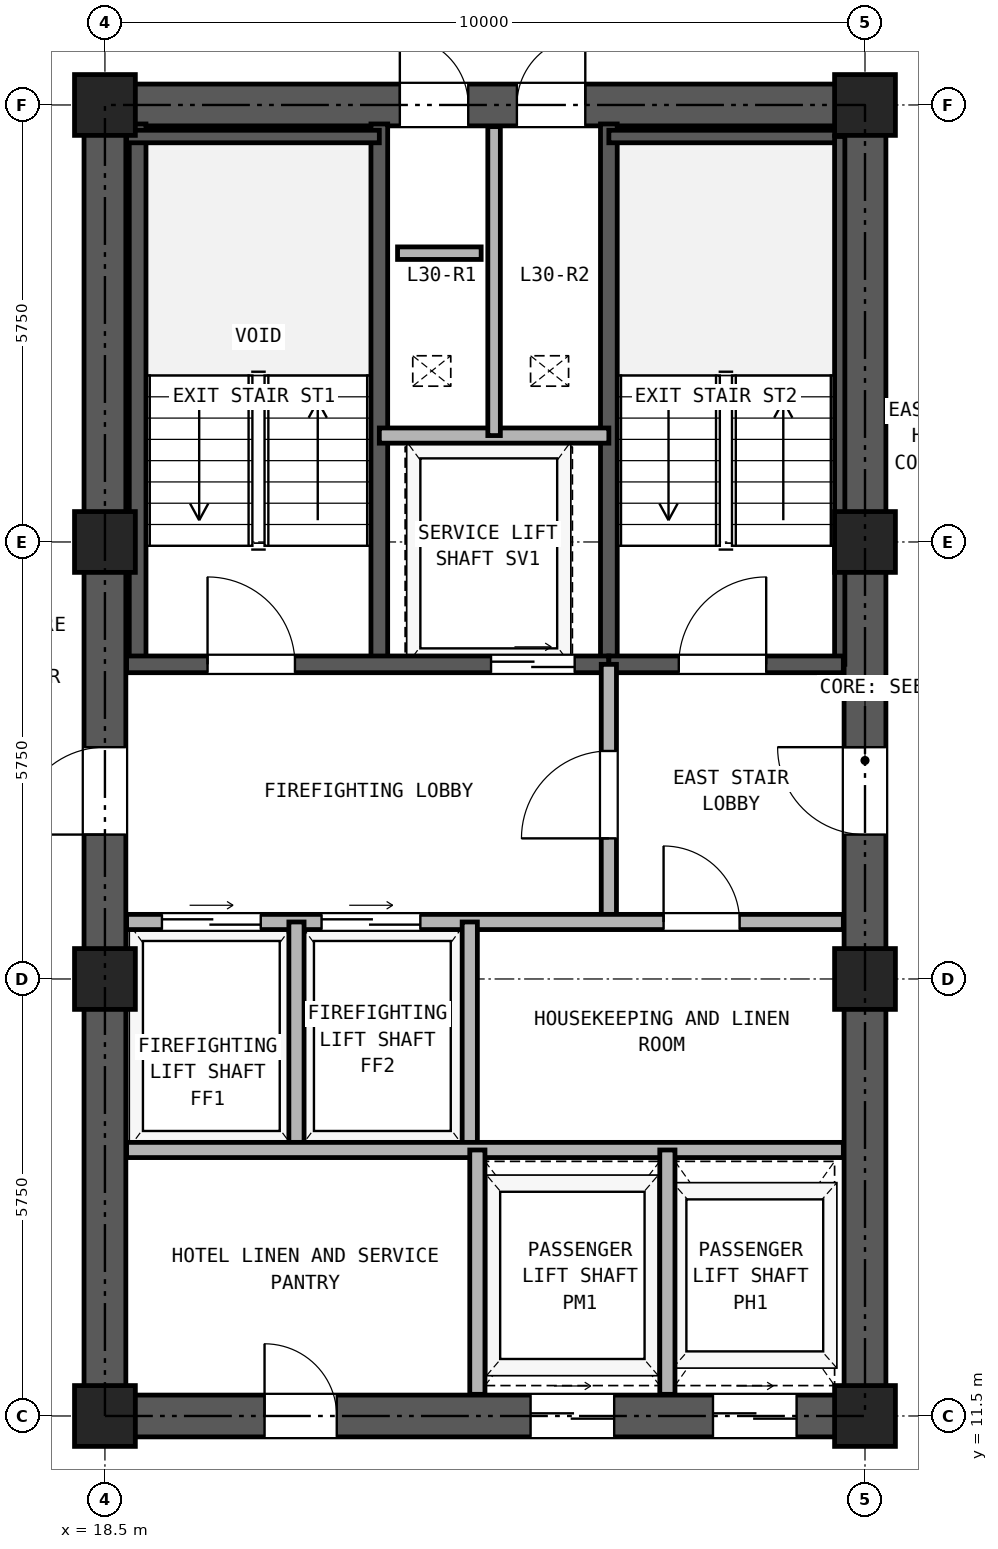
"""IFC4 building model, lengths in metres.
Left out: names, types, materials, properties, quantities, classifications, styles, units other than length and angle.
Written with IfcOpenShell. Run it as: python <this file> out.ifc"""

import sys

from ifc_helpers import new_model, si_unit, direction, frame, frame_2d, origin, origin_2d, place, context, subcontext, project, spatial, rectangle, hollow_rectangle, extrude, source, transform, mapped, element, fill, save


model = new_model("IFC4")
c1 = context("Model", 3, precision=1e-05, world=origin(), true_north=direction((0.0, 1.0)))
c2 = subcontext(c1, "Body", "Model", "MODEL_VIEW")
j1 = project(units=[si_unit("LENGTHUNIT", "METRE"), si_unit("PLANEANGLEUNIT", "RADIAN")], contexts=[c1])
p1 = place(None, origin())
s1 = spatial("IfcSite", under=j1, at=p1, CompositionType="ELEMENT")
p2 = place(p1, origin())
s2 = spatial("IfcBuilding", under=s1, at=p2, CompositionType="ELEMENT")
p3 = place(p2, frame((0.0, 0.0, 111.9)))
s3 = spatial("IfcBuildingStorey", under=s2, at=p3, CompositionType="ELEMENT", Elevation=111.9)
m1 = source(origin(), c2, "Body", "SweptSolid", [
    extrude(hollow_rectangle(XDim=0.8, YDim=0.8, WallThickness=0.045, at=origin_2d()), origin(), (0.0, 0.0, 1.0), 2.95),
])
for number, where, z_axis, x_axis in (
    (1, (18.5, 11.5, 0.0), (0.0, 0.0, 1.0), (1.0, 0.0, 0.0)),
    (2, (18.5, 17.25, 0.0), (0.0, 0.0, 1.0), (1.0, 0.0, 0.0)),
    (3, (18.5, 23.0, 0.0), (0.0, 0.0, 1.0), (1.0, 0.0, 0.0)),
    (4, (18.5, 28.75, 0.0), (0.0, 0.0, 1.0), (1.0, 0.0, 0.0)),
    (5, (28.5, 11.5, 0.0), (0.0, 0.0, 1.0), (1.0, 0.0, 0.0)),
    (6, (28.5, 17.25, 0.0), (0.0, 0.0, 1.0), (1.0, 0.0, 0.0)),
    (7, (28.5, 23.0, 0.0), (0.0, 0.0, 1.0), (1.0, 0.0, 0.0)),
    (8, (28.5, 28.75, 0.0), (0.0, 0.0, 1.0), (1.0, 0.0, 0.0)),
):
    element("IfcColumn", number, at=place(p3, frame(where, z_axis=z_axis, x_axis=x_axis)), inside=s3, PredefinedType="COLUMN", context=c2, shape_type="MappedRepresentation", body=[
        mapped(m1, transform((0.0, 0.0, 0.0), x_axis=(1.0, 0.0, 0.0), y_axis=(0.0, 1.0, 0.0), z_axis=(0.0, 0.0, 1.0), scale=1.0)),
    ])
p4 = place(p3, frame((18.225, 11.5, 0.0), z_axis=(0.0, 0.0, 1.0), x_axis=(1.0, 0.0, 0.0)))
e9 = element("IfcWall", 9, at=p4, inside=s3, PredefinedType="SHEAR", context=c2, shape_type="SweptSolid", body=[
    extrude(rectangle(XDim=10.55, YDim=0.55, at=frame_2d((5.275, 0.0))), origin(), (0.0, 0.0, 1.0), 2.95),
])
p5 = place(p4, frame((2.375, 0.0, 0.0)))
e10 = element("IfcOpeningElement", 10, at=p5, cuts=e9, PredefinedType="OPENING", context=c2, shape_type="SweptSolid", body=[
    extrude(rectangle(XDim=0.95, YDim=2.15, at=frame_2d((0.475, 1.075))), frame((0.0, 0.285, 0.0), z_axis=(0.0, -1.0, 0.0), x_axis=(1.0, 0.0, 0.0)), (0.0, 0.0, 1.0), 0.57),
])
p6 = place(p4, frame((5.875, 0.0, 0.0)))
e11 = element("IfcOpeningElement", 11, at=p6, cuts=e9, PredefinedType="OPENING", context=c2, shape_type="SweptSolid", body=[
    extrude(rectangle(XDim=1.1, YDim=2.25, at=frame_2d((0.55, 1.125))), frame((0.0, 0.285, 0.0), z_axis=(0.0, -1.0, 0.0), x_axis=(1.0, 0.0, 0.0)), (0.0, 0.0, 1.0), 0.57),
])
p7 = place(p4, frame((8.275, 0.0, 0.0)))
e12 = element("IfcOpeningElement", 12, at=p7, cuts=e9, PredefinedType="OPENING", context=c2, shape_type="SweptSolid", body=[
    extrude(rectangle(XDim=1.1, YDim=2.25, at=frame_2d((0.55, 1.125))), frame((0.0, 0.285, 0.0), z_axis=(0.0, -1.0, 0.0), x_axis=(1.0, 0.0, 0.0)), (0.0, 0.0, 1.0), 0.57),
])
p8 = place(p3, frame((18.225, 28.75, 0.0), z_axis=(0.0, 0.0, 1.0), x_axis=(1.0, 0.0, 0.0)))
e13 = element("IfcWall", 13, at=p8, inside=s3, PredefinedType="SHEAR", context=c2, shape_type="SweptSolid", body=[
    extrude(rectangle(XDim=10.55, YDim=0.55, at=frame_2d((5.275, 0.0))), origin(), (0.0, 0.0, 1.0), 2.95),
])
p9 = place(p8, frame((4.155, 0.0, 0.0)))
e14 = element("IfcOpeningElement", 14, at=p9, cuts=e13, PredefinedType="OPENING", context=c2, shape_type="SweptSolid", body=[
    extrude(rectangle(XDim=0.9, YDim=2.05, at=frame_2d((0.45, 1.025))), frame((0.0, 0.285, 0.0), z_axis=(0.0, -1.0, 0.0), x_axis=(1.0, 0.0, 0.0)), (0.0, 0.0, 1.0), 0.57),
])
p10 = place(p8, frame((5.695, 0.0, 0.0)))
e15 = element("IfcOpeningElement", 15, at=p10, cuts=e13, PredefinedType="OPENING", context=c2, shape_type="SweptSolid", body=[
    extrude(rectangle(XDim=0.9, YDim=2.05, at=frame_2d((0.45, 1.025))), frame((0.0, 0.285, 0.0), z_axis=(0.0, -1.0, 0.0), x_axis=(1.0, 0.0, 0.0)), (0.0, 0.0, 1.0), 0.57),
])
p11 = place(p3, frame((18.5, 11.775, 0.0), z_axis=(0.0, 0.0, 1.0), x_axis=(0.0, 1.0, 0.0)))
e16 = element("IfcWall", 16, at=p11, inside=s3, PredefinedType="SHEAR", context=c2, shape_type="SweptSolid", body=[
    extrude(rectangle(XDim=16.7, YDim=0.55, at=frame_2d((8.35, 0.0))), origin(), (0.0, 0.0, 1.0), 2.95),
])
p12 = place(p11, frame((7.375, 0.0, 0.0)))
e17 = element("IfcOpeningElement", 17, at=p12, cuts=e16, PredefinedType="OPENING", context=c2, shape_type="SweptSolid", body=[
    extrude(rectangle(XDim=1.15, YDim=2.2, at=frame_2d((0.575, 1.1))), frame((0.0, 0.285, 0.0), z_axis=(0.0, -1.0, 0.0), x_axis=(1.0, 0.0, 0.0)), (0.0, 0.0, 1.0), 0.57),
])
p13 = place(p3, frame((28.5, 11.775, 0.0), z_axis=(0.0, 0.0, 1.0), x_axis=(0.0, 1.0, 0.0)))
e18 = element("IfcWall", 18, at=p13, inside=s3, PredefinedType="SHEAR", context=c2, shape_type="SweptSolid", body=[
    extrude(rectangle(XDim=16.7, YDim=0.55, at=frame_2d((8.35, 0.0))), origin(), (0.0, 0.0, 1.0), 2.95),
])
p14 = place(p13, frame((7.375, 0.0, 0.0)))
e19 = element("IfcOpeningElement", 19, at=p14, cuts=e18, PredefinedType="OPENING", context=c2, shape_type="SweptSolid", body=[
    extrude(rectangle(XDim=1.15, YDim=2.2, at=frame_2d((0.575, 1.1))), frame((0.0, 0.285, 0.0), z_axis=(0.0, -1.0, 0.0), x_axis=(1.0, 0.0, 0.0)), (0.0, 0.0, 1.0), 0.57),
])
for number, where, z_axis, x_axis in (
    (20, (18.93, 21.39, 0.0), (0.0, 0.0, 1.0), (0.0, 1.0, 0.0)),
    (21, (22.11, 21.39, 0.0), (0.0, 0.0, 1.0), (0.0, 1.0, 0.0)),
    (22, (25.13, 21.39, 0.0), (0.0, 0.0, 1.0), (0.0, 1.0, 0.0)),
):
    element("IfcWall", number, at=place(p3, frame(where, z_axis=z_axis, x_axis=x_axis)), inside=s3, PredefinedType="SOLIDWALL", context=c2, shape_type="SweptSolid", body=[
        extrude(rectangle(XDim=7.11, YDim=0.22, at=frame_2d((3.555, 0.0))), origin(), (0.0, 0.0, 1.0), 2.95),
    ])
p15 = place(p3, frame((18.785, 28.335, 0.0), z_axis=(0.0, 0.0, 1.0), x_axis=(1.0, 0.0, 0.0)))
e23 = element("IfcWall", 23, at=p15, inside=s3, PredefinedType="PARTITIONING", context=c2, shape_type="SweptSolid", body=[
    extrude(rectangle(XDim=3.325, YDim=0.165, at=frame_2d((1.663, 0.0))), origin(), (0.0, 0.0, 1.0), 2.95),
])
p16 = place(p3, frame((25.13, 28.335, 0.0), z_axis=(0.0, 0.0, 1.0), x_axis=(1.0, 0.0, 0.0)))
e24 = element("IfcWall", 24, at=p16, inside=s3, PredefinedType="PARTITIONING", context=c2, shape_type="SweptSolid", body=[
    extrude(rectangle(XDim=3.085, YDim=0.165, at=frame_2d((1.542, 0.0))), origin(), (0.0, 0.0, 1.0), 2.95),
])
p17 = place(p3, frame((28.167, 21.39, 0.0), z_axis=(0.0, 0.0, 1.0), x_axis=(0.0, 1.0, 0.0)))
e25 = element("IfcWall", 25, at=p17, inside=s3, PredefinedType="PARTITIONING", context=c2, shape_type="SweptSolid", body=[
    extrude(rectangle(XDim=6.945, YDim=0.135, at=frame_2d((3.473, 0.0))), origin(), (0.0, 0.0, 1.0), 2.95),
])
p18 = place(p3, frame((18.785, 21.39, 0.0), z_axis=(0.0, 0.0, 1.0), x_axis=(1.0, 0.0, 0.0)))
e26 = element("IfcWall", 26, at=p18, inside=s3, PredefinedType="SOLIDWALL", context=c2, shape_type="SweptSolid", body=[
    extrude(rectangle(XDim=6.345, YDim=0.22, at=frame_2d((3.172, 0.0))), origin(), (0.0, 0.0, 1.0), 2.95),
])
p19 = place(p18, frame((1.065, 0.0, 0.0)))
e27 = element("IfcOpeningElement", 27, at=p19, cuts=e26, PredefinedType="OPENING", context=c2, shape_type="SweptSolid", body=[
    extrude(rectangle(XDim=1.15, YDim=2.2, at=frame_2d((0.575, 1.1))), frame((0.0, 0.12, 0.0), z_axis=(0.0, -1.0, 0.0), x_axis=(1.0, 0.0, 0.0)), (0.0, 0.0, 1.0), 0.24),
])
p20 = place(p18, frame((4.795, 0.0, 0.0)))
e28 = element("IfcOpeningElement", 28, at=p20, cuts=e26, PredefinedType="OPENING", context=c2, shape_type="SweptSolid", body=[
    extrude(rectangle(XDim=1.1, YDim=2.25, at=frame_2d((0.55, 1.125))), frame((0.0, 0.12, 0.0), z_axis=(0.0, -1.0, 0.0), x_axis=(1.0, 0.0, 0.0)), (0.0, 0.0, 1.0), 0.24),
])
p21 = place(p3, frame((25.13, 21.39, 0.0), z_axis=(0.0, 0.0, 1.0), x_axis=(1.0, 0.0, 0.0)))
e29 = element("IfcWall", 29, at=p21, inside=s3, PredefinedType="SOLIDWALL", context=c2, shape_type="SweptSolid", body=[
    extrude(rectangle(XDim=3.085, YDim=0.22, at=frame_2d((1.542, 0.0))), origin(), (0.0, 0.0, 1.0), 2.95),
])
p22 = place(p21, frame((0.92, 0.0, 0.0)))
e30 = element("IfcOpeningElement", 30, at=p22, cuts=e29, PredefinedType="OPENING", context=c2, shape_type="SweptSolid", body=[
    extrude(rectangle(XDim=1.15, YDim=2.2, at=frame_2d((0.575, 1.1))), frame((0.0, 0.12, 0.0), z_axis=(0.0, -1.0, 0.0), x_axis=(1.0, 0.0, 0.0)), (0.0, 0.0, 1.0), 0.24),
])
p23 = place(p3, frame((22.11, 24.4, 0.0), z_axis=(0.0, 0.0, 1.0), x_axis=(1.0, 0.0, 0.0)))
e31 = element("IfcWall", 31, at=p23, inside=s3, PredefinedType="PARTITIONING", context=c2, shape_type="SweptSolid", body=[
    extrude(rectangle(XDim=3.02, YDim=0.2, at=frame_2d((1.51, 0.0))), origin(), (0.0, 0.0, 1.0), 2.95),
])
p24 = place(p3, frame((23.62, 24.4, 0.0), z_axis=(0.0, 0.0, 1.0), x_axis=(0.0, 1.0, 0.0)))
e32 = element("IfcWall", 32, at=p24, inside=s3, PredefinedType="PARTITIONING", context=c2, shape_type="SweptSolid", body=[
    extrude(rectangle(XDim=4.065, YDim=0.165, at=frame_2d((2.033, 0.0))), origin(), (0.0, 0.0, 1.0), 2.95),
])
p25 = place(p3, frame((25.13, 18.0, 0.0), z_axis=(0.0, 0.0, 1.0), x_axis=(0.0, 1.0, 0.0)))
e33 = element("IfcWall", 33, at=p25, inside=s3, PredefinedType="PARTITIONING", context=c2, shape_type="SweptSolid", body=[
    extrude(rectangle(XDim=3.39, YDim=0.2, at=frame_2d((1.695, 0.0))), origin(), (0.0, 0.0, 1.0), 2.95),
])
p26 = place(p25, frame((1.1, 0.0, 0.0)))
e34 = element("IfcOpeningElement", 34, at=p26, cuts=e33, PredefinedType="OPENING", context=c2, shape_type="SweptSolid", body=[
    extrude(rectangle(XDim=1.15, YDim=2.2, at=frame_2d((0.575, 1.1))), frame((0.0, 0.11, 0.0), z_axis=(0.0, -1.0, 0.0), x_axis=(1.0, 0.0, 0.0)), (0.0, 0.0, 1.0), 0.22),
])
p27 = place(p3, frame((18.785, 18.0, 0.0), z_axis=(0.0, 0.0, 1.0), x_axis=(1.0, 0.0, 0.0)))
e35 = element("IfcWall", 35, at=p27, inside=s3, PredefinedType="PARTITIONING", context=c2, shape_type="SweptSolid", body=[
    extrude(rectangle(XDim=9.43, YDim=0.2, at=frame_2d((4.715, 0.0))), origin(), (0.0, 0.0, 1.0), 2.95),
])
p28 = place(p27, frame((0.465, 0.0, 0.0)))
e36 = element("IfcOpeningElement", 36, at=p28, cuts=e35, PredefinedType="OPENING", context=c2, shape_type="SweptSolid", body=[
    extrude(rectangle(XDim=1.3, YDim=2.3, at=frame_2d((0.65, 1.15))), frame((0.0, 0.11, 0.0), z_axis=(0.0, -1.0, 0.0), x_axis=(1.0, 0.0, 0.0)), (0.0, 0.0, 1.0), 0.22),
])
p29 = place(p27, frame((2.565, 0.0, 0.0)))
e37 = element("IfcOpeningElement", 37, at=p29, cuts=e35, PredefinedType="OPENING", context=c2, shape_type="SweptSolid", body=[
    extrude(rectangle(XDim=1.3, YDim=2.3, at=frame_2d((0.65, 1.15))), frame((0.0, 0.11, 0.0), z_axis=(0.0, -1.0, 0.0), x_axis=(1.0, 0.0, 0.0)), (0.0, 0.0, 1.0), 0.22),
])
p30 = place(p27, frame((7.065, 0.0, 0.0)))
e38 = element("IfcOpeningElement", 38, at=p30, cuts=e35, PredefinedType="OPENING", context=c2, shape_type="SweptSolid", body=[
    extrude(rectangle(XDim=1.0, YDim=2.15, at=frame_2d((0.5, 1.075))), frame((0.0, 0.11, 0.0), z_axis=(0.0, -1.0, 0.0), x_axis=(1.0, 0.0, 0.0)), (0.0, 0.0, 1.0), 0.22),
])
for number, where, z_axis, x_axis in (
    (39, (21.02, 15.0, 0.0), (0.0, 0.0, 1.0), (0.0, 1.0, 0.0)),
    (40, (23.3, 15.0, 0.0), (0.0, 0.0, 1.0), (0.0, 1.0, 0.0)),
):
    element("IfcWall", number, at=place(p3, frame(where, z_axis=z_axis, x_axis=x_axis)), inside=s3, PredefinedType="PARTITIONING", context=c2, shape_type="SweptSolid", body=[
        extrude(rectangle(XDim=3.0, YDim=0.2, at=frame_2d((1.5, 0.0))), origin(), (0.0, 0.0, 1.0), 2.95),
    ])
p31 = place(p3, frame((18.785, 15.0, 0.0), z_axis=(0.0, 0.0, 1.0), x_axis=(1.0, 0.0, 0.0)))
e41 = element("IfcWall", 41, at=p31, inside=s3, PredefinedType="PARTITIONING", context=c2, shape_type="SweptSolid", body=[
    extrude(rectangle(XDim=9.43, YDim=0.2, at=frame_2d((4.715, 0.0))), origin(), (0.0, 0.0, 1.0), 2.95),
])
for number, where, z_axis, x_axis in (
    (42, (23.4, 11.785, 0.0), (0.0, 0.0, 1.0), (0.0, 1.0, 0.0)),
    (43, (25.9, 11.785, 0.0), (0.0, 0.0, 1.0), (0.0, 1.0, 0.0)),
):
    element("IfcWall", number, at=place(p3, frame(where, z_axis=z_axis, x_axis=x_axis)), inside=s3, PredefinedType="PARTITIONING", context=c2, shape_type="SweptSolid", body=[
        extrude(rectangle(XDim=3.215, YDim=0.2, at=frame_2d((1.607, 0.0))), origin(), (0.0, 0.0, 1.0), 2.95),
    ])
p32 = place(p3, frame((22.35, 26.8, 0.0), z_axis=(0.0, 0.0, 1.0), x_axis=(1.0, 0.0, 0.0)))
e44 = element("IfcWall", 44, at=p32, inside=s3, PredefinedType="PARTITIONING", context=c2, shape_type="SweptSolid", body=[
    extrude(rectangle(XDim=1.1, YDim=0.165, at=frame_2d((0.55, 0.0))), origin(), (0.0, 0.0, 1.0), 2.95),
])
p33 = place(p19, frame((1.15, 0.0, 0.0), z_axis=(0.0, 0.0, 1.0), x_axis=(-1.0, 0.0, 0.0)))
e45 = element("IfcDoor", 45, at=p33, inside=s3, OperationType="SINGLE_SWING_LEFT", PredefinedType="DOOR", context=c2, shape_type="SweptSolid", body=[
    extrude(rectangle(XDim=1.15, YDim=2.2, at=frame_2d((0.575, 1.1))), frame((0.0, 0.025, 0.0), z_axis=(0.0, -1.0, 0.0), x_axis=(1.0, 0.0, 0.0)), (0.0, 0.0, 1.0), 0.05),
])
fill(e27, e45)
p34 = place(p22, frame((1.15, 0.0, 0.0), z_axis=(0.0, 0.0, 1.0), x_axis=(-1.0, 0.0, 0.0)))
e46 = element("IfcDoor", 46, at=p34, inside=s3, OperationType="SINGLE_SWING_RIGHT", PredefinedType="DOOR", context=c2, shape_type="SweptSolid", body=[
    extrude(rectangle(XDim=1.15, YDim=2.2, at=frame_2d((0.575, 1.1))), frame((0.0, 0.025, 0.0), z_axis=(0.0, -1.0, 0.0), x_axis=(1.0, 0.0, 0.0)), (0.0, 0.0, 1.0), 0.05),
])
fill(e30, e46)
p35 = place(p20, frame((1.1, 0.0, 0.0), z_axis=(0.0, 0.0, 1.0), x_axis=(-1.0, 0.0, 0.0)))
e47 = element("IfcDoor", 47, at=p35, inside=s3, OperationType="DOUBLE_DOOR_SLIDING", PredefinedType="DOOR", context=c2, shape_type="SweptSolid", body=[
    extrude(rectangle(XDim=1.1, YDim=2.25, at=frame_2d((0.55, 1.125))), frame((0.0, 0.025, 0.0), z_axis=(0.0, -1.0, 0.0), x_axis=(1.0, 0.0, 0.0)), (0.0, 0.0, 1.0), 0.05),
])
fill(e28, e47)
p36 = place(p26, origin())
e48 = element("IfcDoor", 48, at=p36, inside=s3, OperationType="SINGLE_SWING_LEFT", PredefinedType="DOOR", context=c2, shape_type="SweptSolid", body=[
    extrude(rectangle(XDim=1.15, YDim=2.2, at=frame_2d((0.575, 1.1))), frame((0.0, 0.025, 0.0), z_axis=(0.0, -1.0, 0.0), x_axis=(1.0, 0.0, 0.0)), (0.0, 0.0, 1.0), 0.05),
])
fill(e34, e48)
p37 = place(p28, origin())
e49 = element("IfcDoor", 49, at=p37, inside=s3, OperationType="DOUBLE_DOOR_SLIDING", PredefinedType="DOOR", context=c2, shape_type="SweptSolid", body=[
    extrude(rectangle(XDim=1.3, YDim=2.3, at=frame_2d((0.65, 1.15))), frame((0.0, 0.025, 0.0), z_axis=(0.0, -1.0, 0.0), x_axis=(1.0, 0.0, 0.0)), (0.0, 0.0, 1.0), 0.05),
])
fill(e36, e49)
p38 = place(p29, origin())
e50 = element("IfcDoor", 50, at=p38, inside=s3, OperationType="DOUBLE_DOOR_SLIDING", PredefinedType="DOOR", context=c2, shape_type="SweptSolid", body=[
    extrude(rectangle(XDim=1.3, YDim=2.3, at=frame_2d((0.65, 1.15))), frame((0.0, 0.025, 0.0), z_axis=(0.0, -1.0, 0.0), x_axis=(1.0, 0.0, 0.0)), (0.0, 0.0, 1.0), 0.05),
])
fill(e37, e50)
p39 = place(p30, frame((1.0, 0.0, 0.0), z_axis=(0.0, 0.0, 1.0), x_axis=(-1.0, 0.0, 0.0)))
e51 = element("IfcDoor", 51, at=p39, inside=s3, OperationType="SINGLE_SWING_LEFT", PredefinedType="DOOR", context=c2, shape_type="SweptSolid", body=[
    extrude(rectangle(XDim=1.0, YDim=2.15, at=frame_2d((0.5, 1.075))), frame((0.0, 0.025, 0.0), z_axis=(0.0, -1.0, 0.0), x_axis=(1.0, 0.0, 0.0)), (0.0, 0.0, 1.0), 0.05),
])
fill(e38, e51)
p40 = place(p12, frame((1.15, 0.0, 0.0), z_axis=(0.0, 0.0, 1.0), x_axis=(-1.0, 0.0, 0.0)))
e52 = element("IfcDoor", 52, at=p40, inside=s3, OperationType="SINGLE_SWING_LEFT", PredefinedType="DOOR", context=c2, shape_type="SweptSolid", body=[
    extrude(rectangle(XDim=1.15, YDim=2.2, at=frame_2d((0.575, 1.1))), frame((0.0, 0.025, 0.0), z_axis=(0.0, -1.0, 0.0), x_axis=(1.0, 0.0, 0.0)), (0.0, 0.0, 1.0), 0.05),
])
fill(e17, e52)
p41 = place(p14, origin())
e53 = element("IfcDoor", 53, at=p41, inside=s3, OperationType="SINGLE_SWING_RIGHT", PredefinedType="DOOR", context=c2, shape_type="SweptSolid", body=[
    extrude(rectangle(XDim=1.15, YDim=2.2, at=frame_2d((0.575, 1.1))), frame((0.0, 0.025, 0.0), z_axis=(0.0, -1.0, 0.0), x_axis=(1.0, 0.0, 0.0)), (0.0, 0.0, 1.0), 0.05),
])
fill(e19, e53)
p42 = place(p9, origin())
e54 = element("IfcDoor", 54, at=p42, inside=s3, OperationType="SINGLE_SWING_LEFT", PredefinedType="DOOR", context=c2, shape_type="SweptSolid", body=[
    extrude(rectangle(XDim=0.9, YDim=2.05, at=frame_2d((0.45, 1.025))), frame((0.0, 0.025, 0.0), z_axis=(0.0, -1.0, 0.0), x_axis=(1.0, 0.0, 0.0)), (0.0, 0.0, 1.0), 0.05),
])
fill(e14, e54)
p43 = place(p10, origin())
e55 = element("IfcDoor", 55, at=p43, inside=s3, OperationType="SINGLE_SWING_RIGHT", PredefinedType="DOOR", context=c2, shape_type="SweptSolid", body=[
    extrude(rectangle(XDim=0.9, YDim=2.05, at=frame_2d((0.45, 1.025))), frame((0.0, 0.025, 0.0), z_axis=(0.0, -1.0, 0.0), x_axis=(1.0, 0.0, 0.0)), (0.0, 0.0, 1.0), 0.05),
])
fill(e15, e55)
p44 = place(p5, frame((0.95, 0.0, 0.0), z_axis=(0.0, 0.0, 1.0), x_axis=(-1.0, 0.0, 0.0)))
e56 = element("IfcDoor", 56, at=p44, inside=s3, OperationType="SINGLE_SWING_LEFT", PredefinedType="DOOR", context=c2, shape_type="SweptSolid", body=[
    extrude(rectangle(XDim=0.95, YDim=2.15, at=frame_2d((0.475, 1.075))), frame((0.0, 0.025, 0.0), z_axis=(0.0, -1.0, 0.0), x_axis=(1.0, 0.0, 0.0)), (0.0, 0.0, 1.0), 0.05),
])
fill(e10, e56)
p45 = place(p6, frame((1.1, 0.0, 0.0), z_axis=(0.0, 0.0, 1.0), x_axis=(-1.0, 0.0, 0.0)))
e57 = element("IfcDoor", 57, at=p45, inside=s3, OperationType="DOUBLE_DOOR_SLIDING", PredefinedType="DOOR", context=c2, shape_type="SweptSolid", body=[
    extrude(rectangle(XDim=1.1, YDim=2.25, at=frame_2d((0.55, 1.125))), frame((0.0, 0.025, 0.0), z_axis=(0.0, -1.0, 0.0), x_axis=(1.0, 0.0, 0.0)), (0.0, 0.0, 1.0), 0.05),
])
fill(e11, e57)
p46 = place(p7, frame((1.1, 0.0, 0.0), z_axis=(0.0, 0.0, 1.0), x_axis=(-1.0, 0.0, 0.0)))
e58 = element("IfcDoor", 58, at=p46, inside=s3, OperationType="DOUBLE_DOOR_SLIDING", PredefinedType="DOOR", context=c2, shape_type="SweptSolid", body=[
    extrude(rectangle(XDim=1.1, YDim=2.25, at=frame_2d((0.55, 1.125))), frame((0.0, 0.025, 0.0), z_axis=(0.0, -1.0, 0.0), x_axis=(1.0, 0.0, 0.0)), (0.0, 0.0, 1.0), 0.05),
])
fill(e12, e58)
save(model, sys.argv[1])
